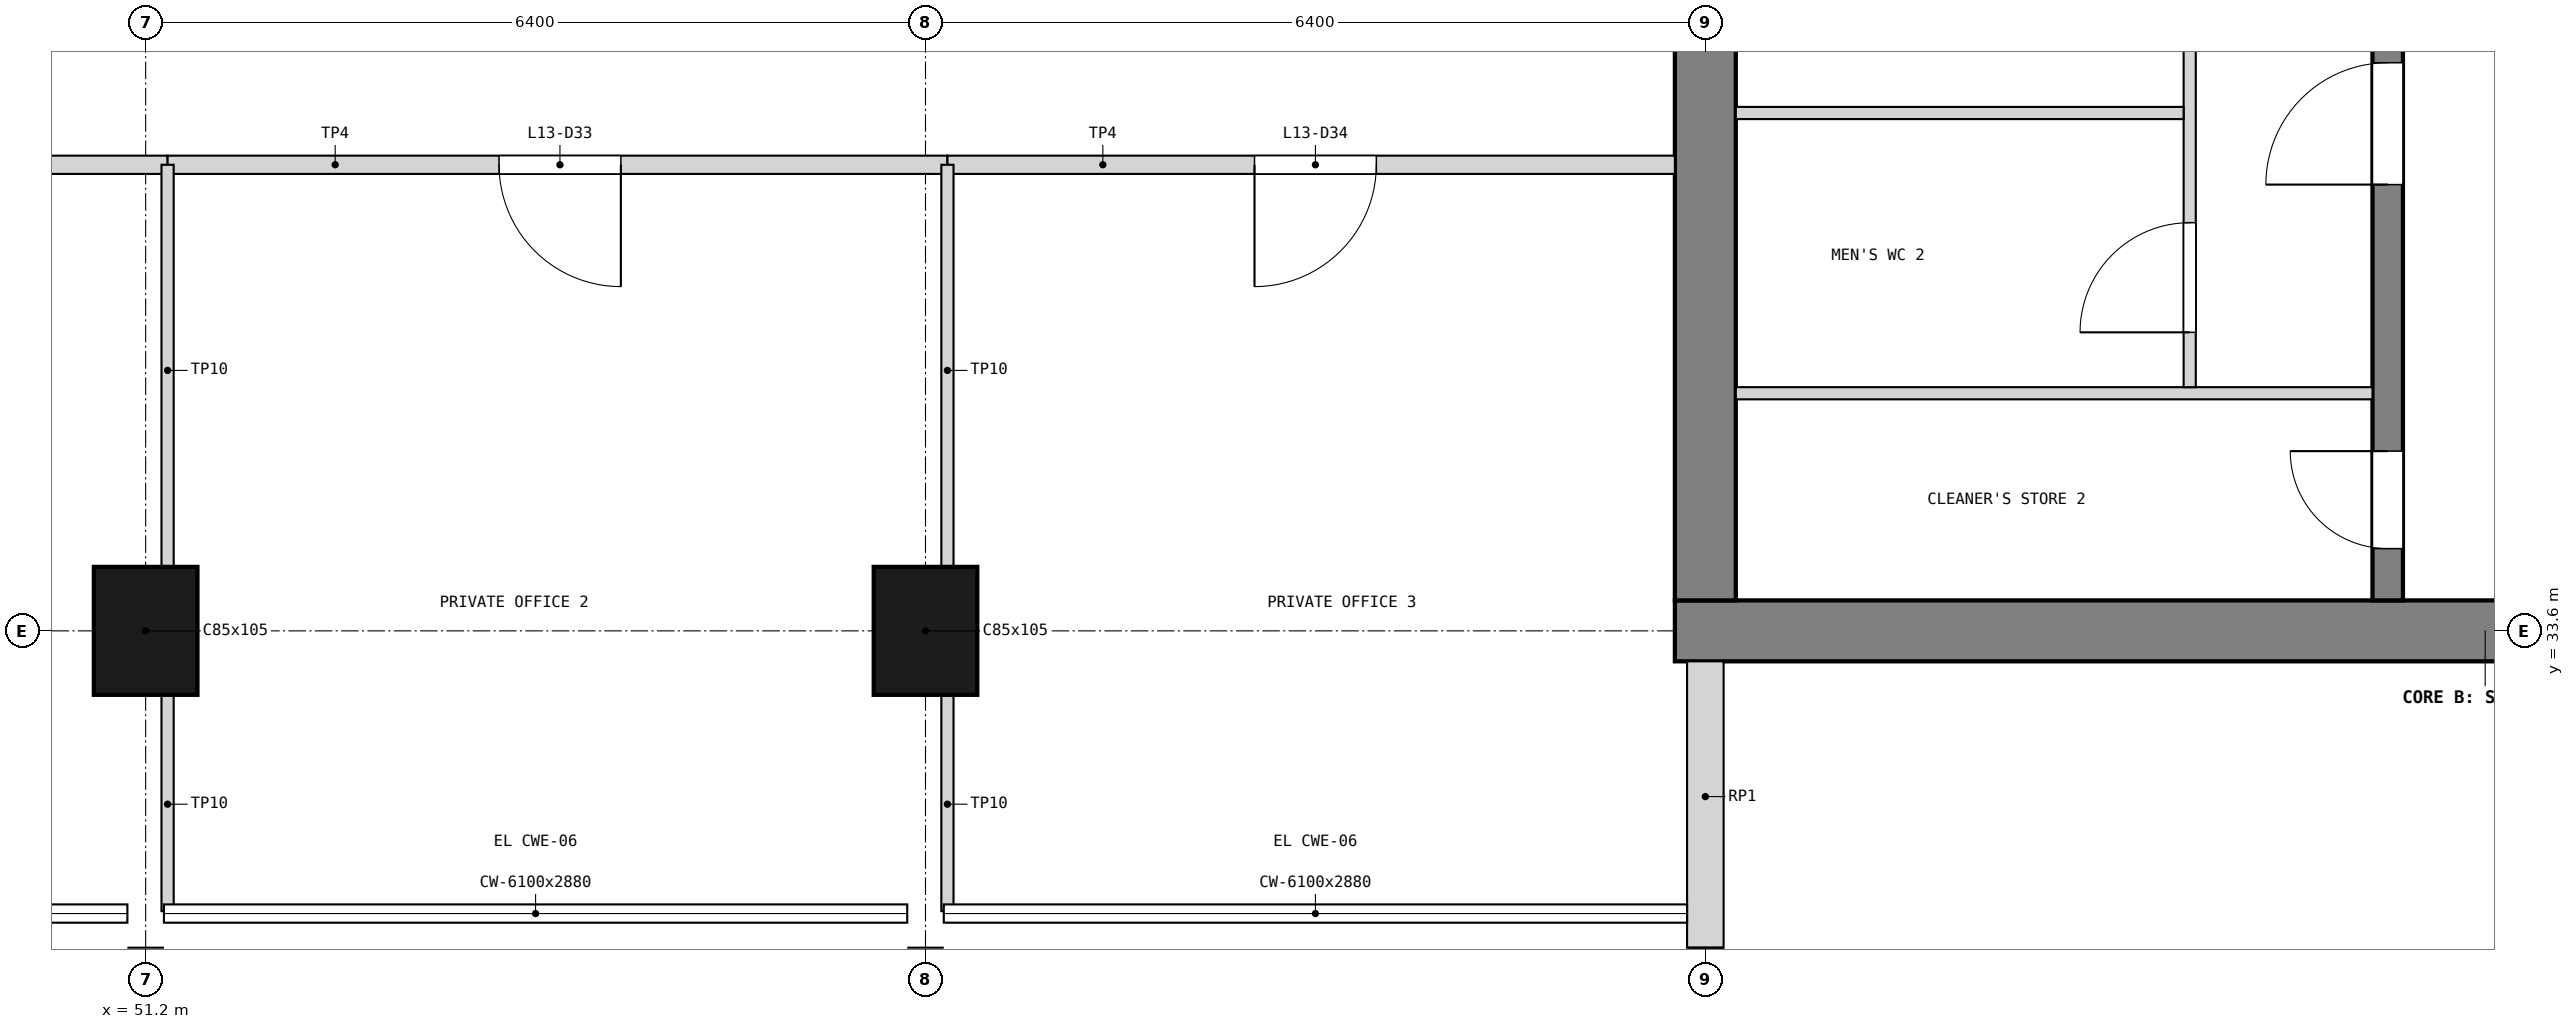
"""IFC4 building model, lengths in metres.
Left out: names, types, materials, properties, quantities, classifications, styles, units other than length and angle.
Written with IfcOpenShell. Run it as: python <this file> out.ifc"""

import sys

from ifc_helpers import new_model, si_unit, direction, frame, frame_2d, origin, origin_2d, place, context, subcontext, project, spatial, rectangle, extrude, element, fill, save


model = new_model("IFC4")
c1 = context("Model", 3, precision=1e-05, world=origin(), true_north=direction((0.0, 1.0)))
c2 = subcontext(c1, "Body", "Model", "MODEL_VIEW")
j1 = project(units=[si_unit("LENGTHUNIT", "METRE"), si_unit("PLANEANGLEUNIT", "RADIAN")], contexts=[c1])
p1 = place(None, origin())
s1 = spatial("IfcSite", under=j1, at=p1, CompositionType="ELEMENT")
p2 = place(p1, origin())
s2 = spatial("IfcBuilding", under=s1, at=p2, CompositionType="ELEMENT")
p3 = place(p2, frame((0.0, 0.0, 52.2)))
s3 = spatial("IfcBuildingStorey", under=s2, at=p3, CompositionType="ELEMENT", Elevation=52.2)
p4 = place(p3, frame((63.75, 33.6, 0.0), z_axis=(0.0, 0.0, 1.0), x_axis=(1.0, 0.0, 0.0)))
e1 = element("IfcWall", 1, at=p4, inside=s3, PredefinedType="SHEAR", context=c2, shape_type="SweptSolid", body=[
    extrude(rectangle(XDim=13.3, YDim=0.5, at=frame_2d((6.65, 0.0))), origin(), (0.0, 0.0, 1.0), 3.9),
])
p5 = place(p4, frame((11.05, 0.0, 1.0)))
e2 = element("IfcOpeningElement", 2, at=p5, cuts=e1, PredefinedType="OPENING", context=c2, shape_type="SweptSolid", body=[
    extrude(rectangle(XDim=0.4, YDim=2.0, at=frame_2d((0.2, 1.0))), frame((0.0, 0.26, 0.0), z_axis=(0.0, -1.0, 0.0), x_axis=(1.0, 0.0, 0.0)), (0.0, 0.0, 1.0), 0.52),
])
p6 = place(p3, frame((64.0, 33.85, 0.0), z_axis=(0.0, 0.0, 1.0), x_axis=(0.0, 1.0, 0.0)))
e3 = element("IfcWall", 3, at=p6, inside=s3, PredefinedType="SHEAR", context=c2, shape_type="SweptSolid", body=[
    extrude(rectangle(XDim=18.7, YDim=0.5, at=frame_2d((9.35, 0.0))), origin(), (0.0, 0.0, 1.0), 3.9),
])
p7 = place(p6, frame((8.35, 0.0, 0.0)))
e4 = element("IfcOpeningElement", 4, at=p7, cuts=e3, PredefinedType="OPENING", context=c2, shape_type="SweptSolid", body=[
    extrude(rectangle(XDim=2.0, YDim=2.1, at=frame_2d((1.0, 1.05))), frame((0.0, 0.26, 0.0), z_axis=(0.0, -1.0, 0.0), x_axis=(1.0, 0.0, 0.0)), (0.0, 0.0, 1.0), 0.52),
])
for number, where, z_axis, x_axis in (
    (5, (51.2, 33.6, 0.0), (0.0, 0.0, 1.0), (1.0, 0.0, 0.0)),
    (6, (57.6, 33.6, 0.0), (0.0, 0.0, 1.0), (1.0, 0.0, 0.0)),
):
    element("IfcColumn", number, at=place(p3, frame(where, z_axis=z_axis, x_axis=x_axis)), inside=s3, PredefinedType="COLUMN", context=c2, shape_type="SweptSolid", body=[
        extrude(rectangle(XDim=0.85, YDim=1.05, at=origin_2d()), origin(), (0.0, 0.0, 1.0), 3.9),
    ])
p8 = place(p3, frame((64.0, 31.0, 0.0), z_axis=(0.0, 0.0, 1.0), x_axis=(0.0, 1.0, 0.0)))
e7 = element("IfcWall", 7, at=p8, inside=s3, PredefinedType="SOLIDWALL", context=c2, shape_type="SweptSolid", body=[
    extrude(rectangle(XDim=2.35, YDim=0.3, at=frame_2d((1.175, 0.0))), origin(), (0.0, 0.0, 1.0), 2.88),
])
p9 = place(p3, frame((69.6, 33.85, 0.0), z_axis=(0.0, 0.0, 1.0), x_axis=(0.0, 1.0, 0.0)))
e8 = element("IfcWall", 8, at=p9, inside=s3, PredefinedType="SOLIDWALL", context=c2, shape_type="SweptSolid", body=[
    extrude(rectangle(XDim=6.075, YDim=0.25, at=frame_2d((3.038, 0.0))), origin(), (0.0, 0.0, 1.0), 3.6),
])
p10 = place(p9, frame((0.425, 0.0, 0.0)))
e9 = element("IfcOpeningElement", 9, at=p10, cuts=e8, PredefinedType="OPENING", context=c2, shape_type="SweptSolid", body=[
    extrude(rectangle(XDim=0.8, YDim=2.1, at=frame_2d((0.4, 1.05))), frame((0.0, 0.135, 0.0), z_axis=(0.0, -1.0, 0.0), x_axis=(1.0, 0.0, 0.0)), (0.0, 0.0, 1.0), 0.27),
])
p11 = place(p9, frame((3.413, 0.0, 0.0)))
e10 = element("IfcOpeningElement", 10, at=p11, cuts=e8, PredefinedType="OPENING", context=c2, shape_type="SweptSolid", body=[
    extrude(rectangle(XDim=1.0, YDim=2.1, at=frame_2d((0.5, 1.05))), frame((0.0, 0.135, 0.0), z_axis=(0.0, -1.0, 0.0), x_axis=(1.0, 0.0, 0.0)), (0.0, 0.0, 1.0), 0.27),
])
p12 = place(p3, frame((69.475, 35.55, 0.0), z_axis=(0.0, 0.0, 1.0), x_axis=(-1.0, 0.0, 0.0)))
e11 = element("IfcWall", 11, at=p12, inside=s3, PredefinedType="PARTITIONING", context=c2, shape_type="SweptSolid", body=[
    extrude(rectangle(XDim=5.225, YDim=0.1, at=frame_2d((2.613, 0.0))), origin(), (0.0, 0.0, 1.0), 3.6),
])
p13 = place(p3, frame((67.975, 35.6, 0.0), z_axis=(0.0, 0.0, 1.0), x_axis=(0.0, 1.0, 0.0)))
e12 = element("IfcWall", 12, at=p13, inside=s3, PredefinedType="PARTITIONING", context=c2, shape_type="SweptSolid", body=[
    extrude(rectangle(XDim=4.325, YDim=0.1, at=frame_2d((2.163, 0.0))), origin(), (0.0, 0.0, 1.0), 3.6),
])
p14 = place(p13, frame((0.45, 0.0, 0.0)))
e13 = element("IfcOpeningElement", 13, at=p14, cuts=e12, PredefinedType="OPENING", context=c2, shape_type="SweptSolid", body=[
    extrude(rectangle(XDim=0.9, YDim=2.1, at=frame_2d((0.45, 1.05))), frame((0.0, 0.06, 0.0), z_axis=(0.0, -1.0, 0.0), x_axis=(1.0, 0.0, 0.0)), (0.0, 0.0, 1.0), 0.12),
])
p15 = place(p13, frame((2.812, 0.0, 0.0)))
e14 = element("IfcOpeningElement", 14, at=p15, cuts=e12, PredefinedType="OPENING", context=c2, shape_type="SweptSolid", body=[
    extrude(rectangle(XDim=1.0, YDim=2.1, at=frame_2d((0.5, 1.05))), frame((0.0, 0.06, 0.0), z_axis=(0.0, -1.0, 0.0), x_axis=(1.0, 0.0, 0.0)), (0.0, 0.0, 1.0), 0.12),
])
p16 = place(p3, frame((67.925, 37.85, 0.0), z_axis=(0.0, 0.0, 1.0), x_axis=(-1.0, 0.0, 0.0)))
e15 = element("IfcWall", 15, at=p16, inside=s3, PredefinedType="PARTITIONING", context=c2, shape_type="SweptSolid", body=[
    extrude(rectangle(XDim=3.675, YDim=0.1, at=frame_2d((1.837, 0.0))), origin(), (0.0, 0.0, 1.0), 3.6),
])
p17 = place(p3, frame((44.62, 37.425, 0.0), z_axis=(0.0, 0.0, 1.0), x_axis=(1.0, 0.0, 0.0)))
e16 = element("IfcWall", 16, at=p17, inside=s3, PredefinedType="PARTITIONING", context=c2, shape_type="SweptSolid", body=[
    extrude(rectangle(XDim=6.76, YDim=0.15, at=frame_2d((3.38, 0.0))), origin(), (0.0, 0.0, 1.0), 3.68),
])
p18 = place(p17, frame((2.48, 0.0, 0.0)))
e17 = element("IfcOpeningElement", 17, at=p18, cuts=e16, PredefinedType="OPENING", context=c2, shape_type="SweptSolid", body=[
    extrude(rectangle(XDim=1.8, YDim=2.1, at=frame_2d((0.9, 1.05))), frame((0.0, 0.085, 0.0), z_axis=(0.0, -1.0, 0.0), x_axis=(1.0, 0.0, 0.0)), (0.0, 0.0, 1.0), 0.17),
])
p19 = place(p3, frame((51.38, 37.425, 0.0), z_axis=(0.0, 0.0, 1.0), x_axis=(1.0, 0.0, 0.0)))
e18 = element("IfcWall", 18, at=p19, inside=s3, PredefinedType="PARTITIONING", context=c2, shape_type="SweptSolid", body=[
    extrude(rectangle(XDim=6.4, YDim=0.15, at=frame_2d((3.2, 0.0))), origin(), (0.0, 0.0, 1.0), 3.68),
])
p20 = place(p19, frame((2.72, 0.0, 0.0)))
e19 = element("IfcOpeningElement", 19, at=p20, cuts=e18, PredefinedType="OPENING", context=c2, shape_type="SweptSolid", body=[
    extrude(rectangle(XDim=1.0, YDim=2.1, at=frame_2d((0.5, 1.05))), frame((0.0, 0.085, 0.0), z_axis=(0.0, -1.0, 0.0), x_axis=(1.0, 0.0, 0.0)), (0.0, 0.0, 1.0), 0.17),
])
p21 = place(p3, frame((57.78, 37.425, 0.0), z_axis=(0.0, 0.0, 1.0), x_axis=(1.0, 0.0, 0.0)))
e20 = element("IfcWall", 20, at=p21, inside=s3, PredefinedType="PARTITIONING", context=c2, shape_type="SweptSolid", body=[
    extrude(rectangle(XDim=5.97, YDim=0.15, at=frame_2d((2.985, 0.0))), origin(), (0.0, 0.0, 1.0), 3.68),
])
p22 = place(p21, frame((2.52, 0.0, 0.0)))
e21 = element("IfcOpeningElement", 21, at=p22, cuts=e20, PredefinedType="OPENING", context=c2, shape_type="SweptSolid", body=[
    extrude(rectangle(XDim=1.0, YDim=2.1, at=frame_2d((0.5, 1.05))), frame((0.0, 0.085, 0.0), z_axis=(0.0, -1.0, 0.0), x_axis=(1.0, 0.0, 0.0)), (0.0, 0.0, 1.0), 0.17),
])
p23 = place(p3, frame((51.38, 31.3, 0.0), z_axis=(0.0, 0.0, 1.0), x_axis=(0.0, 1.0, 0.0)))
e22 = element("IfcWall", 22, at=p23, inside=s3, PredefinedType="PARTITIONING", context=c2, shape_type="SweptSolid", body=[
    extrude(rectangle(XDim=1.795, YDim=0.1, at=frame_2d((0.897, 0.0))), origin(), (0.0, 0.0, 1.0), 2.78),
])
p24 = place(p3, frame((51.38, 34.105, 0.0), z_axis=(0.0, 0.0, 1.0), x_axis=(0.0, 1.0, 0.0)))
e23 = element("IfcWall", 23, at=p24, inside=s3, PredefinedType="PARTITIONING", context=c2, shape_type="SweptSolid", body=[
    extrude(rectangle(XDim=3.32, YDim=0.1, at=frame_2d((1.66, 0.0))), origin(), (0.0, 0.0, 1.0), 2.78),
])
p25 = place(p3, frame((57.78, 31.3, 0.0), z_axis=(0.0, 0.0, 1.0), x_axis=(0.0, 1.0, 0.0)))
e24 = element("IfcWall", 24, at=p25, inside=s3, PredefinedType="PARTITIONING", context=c2, shape_type="SweptSolid", body=[
    extrude(rectangle(XDim=1.795, YDim=0.1, at=frame_2d((0.897, 0.0))), origin(), (0.0, 0.0, 1.0), 2.78),
])
p26 = place(p3, frame((57.78, 34.105, 0.0), z_axis=(0.0, 0.0, 1.0), x_axis=(0.0, 1.0, 0.0)))
e25 = element("IfcWall", 25, at=p26, inside=s3, PredefinedType="PARTITIONING", context=c2, shape_type="SweptSolid", body=[
    extrude(rectangle(XDim=3.32, YDim=0.1, at=frame_2d((1.66, 0.0))), origin(), (0.0, 0.0, 1.0), 2.78),
])
p27 = place(p10, origin())
e26 = element("IfcDoor", 26, at=p27, inside=s3, OperationType="SINGLE_SWING_RIGHT", PredefinedType="DOOR", context=c2, shape_type="SweptSolid", body=[
    extrude(rectangle(XDim=0.8, YDim=2.1, at=frame_2d((0.4, 1.05))), frame((0.0, 0.025, 0.0), z_axis=(0.0, -1.0, 0.0), x_axis=(1.0, 0.0, 0.0)), (0.0, 0.0, 1.0), 0.05),
])
fill(e9, e26)
p28 = place(p11, origin())
e27 = element("IfcDoor", 27, at=p28, inside=s3, OperationType="SINGLE_SWING_LEFT", PredefinedType="DOOR", context=c2, shape_type="SweptSolid", body=[
    extrude(rectangle(XDim=1.0, YDim=2.1, at=frame_2d((0.5, 1.05))), frame((0.0, 0.025, 0.0), z_axis=(0.0, -1.0, 0.0), x_axis=(1.0, 0.0, 0.0)), (0.0, 0.0, 1.0), 0.05),
])
fill(e10, e27)
p29 = place(p14, origin())
e28 = element("IfcDoor", 28, at=p29, inside=s3, OperationType="SINGLE_SWING_LEFT", PredefinedType="DOOR", context=c2, shape_type="SweptSolid", body=[
    extrude(rectangle(XDim=0.9, YDim=2.1, at=frame_2d((0.45, 1.05))), frame((0.0, 0.025, 0.0), z_axis=(0.0, -1.0, 0.0), x_axis=(1.0, 0.0, 0.0)), (0.0, 0.0, 1.0), 0.05),
])
fill(e13, e28)
p30 = place(p20, frame((1.0, 0.0, 0.0), z_axis=(0.0, 0.0, 1.0), x_axis=(-1.0, 0.0, 0.0)))
e29 = element("IfcDoor", 29, at=p30, inside=s3, OperationType="SINGLE_SWING_LEFT", PredefinedType="DOOR", context=c2, shape_type="SweptSolid", body=[
    extrude(rectangle(XDim=1.0, YDim=2.1, at=frame_2d((0.5, 1.05))), frame((0.0, 0.025, 0.0), z_axis=(0.0, -1.0, 0.0), x_axis=(1.0, 0.0, 0.0)), (0.0, 0.0, 1.0), 0.05),
])
fill(e19, e29)
p31 = place(p22, frame((1.0, 0.0, 0.0), z_axis=(0.0, 0.0, 1.0), x_axis=(-1.0, 0.0, 0.0)))
e30 = element("IfcDoor", 30, at=p31, inside=s3, OperationType="SINGLE_SWING_RIGHT", PredefinedType="DOOR", context=c2, shape_type="SweptSolid", body=[
    extrude(rectangle(XDim=1.0, YDim=2.1, at=frame_2d((0.5, 1.05))), frame((0.0, 0.025, 0.0), z_axis=(0.0, -1.0, 0.0), x_axis=(1.0, 0.0, 0.0)), (0.0, 0.0, 1.0), 0.05),
])
fill(e21, e30)
save(model, sys.argv[1])
